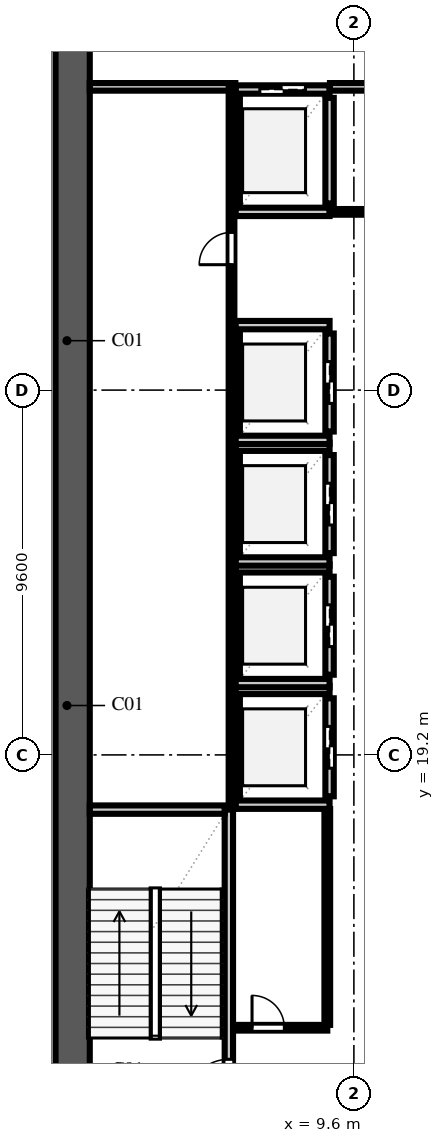
"""IFC4 building model, lengths in metres.
Left out: names, types, materials, properties, quantities, classifications, styles, units other than length and angle.
Written with IfcOpenShell. Run it as: python <this file> out.ifc"""

import sys

from ifc_helpers import new_model, si_unit, direction, frame, frame_2d, origin, place, context, subcontext, project, spatial, rectangle, extrude, element, fill, save


model = new_model("IFC4")
c1 = context("Model", 3, precision=1e-05, world=origin(), true_north=direction((0.0, 1.0)))
c2 = subcontext(c1, "Body", "Model", "MODEL_VIEW")
j1 = project(units=[si_unit("LENGTHUNIT", "METRE"), si_unit("PLANEANGLEUNIT", "RADIAN")], contexts=[c1])
p1 = place(None, origin())
s1 = spatial("IfcSite", under=j1, at=p1, CompositionType="ELEMENT")
p2 = place(p1, origin())
s2 = spatial("IfcBuilding", under=s1, at=p2, CompositionType="ELEMENT")
p3 = place(p2, frame((0.0, 0.0, 5.2)))
s3 = spatial("IfcBuildingStorey", under=s2, at=p3, CompositionType="ELEMENT", Elevation=5.2)
p4 = place(p3, frame((2.2, 9.15, 0.0), z_axis=(0.0, 0.0, 1.0), x_axis=(0.0, 1.0, 0.0)))
e1 = element("IfcWall", 1, at=p4, inside=s3, PredefinedType="SHEAR", context=c2, shape_type="SweptSolid", body=[
    extrude(rectangle(XDim=39.3, YDim=0.9, at=frame_2d((19.65, 0.0))), origin(), (0.0, 0.0, 1.0), 4.86),
])
p5 = place(p3, frame((6.31, 9.95, 0.0), z_axis=(0.0, 0.0, 1.0), x_axis=(0.0, 1.0, 0.0)))
e2 = element("IfcWall", 2, at=p5, inside=s3, PredefinedType="SOLIDWALL", context=c2, shape_type="SweptSolid", body=[
    extrude(rectangle(XDim=7.81, YDim=0.22, at=frame_2d((3.905, 0.0))), origin(), (0.0, 0.0, 1.0), 4.86),
])
p6 = place(p5, frame((0.14, 0.0, 0.0)))
e3 = element("IfcOpeningElement", 3, at=p6, cuts=e2, PredefinedType="OPENING", context=c2, shape_type="SweptSolid", body=[
    extrude(rectangle(XDim=1.1, YDim=2.2, at=frame_2d((0.55, 1.1))), frame((0.0, 0.122, 0.0), z_axis=(0.0, -1.0, 0.0), x_axis=(1.0, 0.0, 0.0)), (0.0, 0.0, 1.0), 0.244),
])
p7 = place(p3, frame((2.65, 17.76, 0.0), z_axis=(0.0, 0.0, 1.0), x_axis=(1.0, 0.0, 0.0)))
e4 = element("IfcWall", 4, at=p7, inside=s3, PredefinedType="SOLIDWALL", context=c2, shape_type="SweptSolid", body=[
    extrude(rectangle(XDim=3.55, YDim=0.22, at=frame_2d((1.775, 0.0))), origin(), (0.0, 0.0, 1.0), 4.86),
])
p8 = place(p3, frame((6.49, 18.11, 0.0), z_axis=(0.0, 0.0, 1.0), x_axis=(0.0, 1.0, 0.0)))
e5 = element("IfcWall", 5, at=p8, inside=s3, PredefinedType="SOLIDWALL", context=c2, shape_type="SweptSolid", body=[
    extrude(rectangle(XDim=2.58, YDim=0.22, at=frame_2d((1.29, 0.0))), origin(), (0.0, 0.0, 1.0), 4.86),
])
p9 = place(p3, frame((8.96, 18.11, 0.0), z_axis=(0.0, 0.0, 1.0), x_axis=(0.0, 1.0, 0.0)))
e6 = element("IfcWall", 6, at=p9, inside=s3, PredefinedType="SOLIDWALL", context=c2, shape_type="SweptSolid", body=[
    extrude(rectangle(XDim=2.58, YDim=0.22, at=frame_2d((1.29, 0.0))), origin(), (0.0, 0.0, 1.0), 4.86),
])
p10 = place(p9, frame((0.74, 0.0, 0.0)))
e7 = element("IfcOpeningElement", 7, at=p10, cuts=e6, PredefinedType="OPENING", context=c2, shape_type="SweptSolid", body=[
    extrude(rectangle(XDim=1.1, YDim=2.2, at=frame_2d((0.55, 1.1))), frame((0.0, 0.122, 0.0), z_axis=(0.0, -1.0, 0.0), x_axis=(1.0, 0.0, 0.0)), (0.0, 0.0, 1.0), 0.244),
])
for number, where, z_axis, x_axis in (
    (8, (6.49, 17.89, 0.0), (0.0, 0.0, 1.0), (1.0, 0.0, 0.0)),
    (9, (6.49, 20.91, 0.0), (0.0, 0.0, 1.0), (1.0, 0.0, 0.0)),
):
    element("IfcWall", number, at=place(p3, frame(where, z_axis=z_axis, x_axis=x_axis)), inside=s3, PredefinedType="SOLIDWALL", context=c2, shape_type="SweptSolid", body=[
        extrude(rectangle(XDim=2.47, YDim=0.22, at=frame_2d((1.235, 0.0))), origin(), (0.0, 0.0, 1.0), 4.86),
    ])
p11 = place(p3, frame((6.49, 21.31, 0.0), z_axis=(0.0, 0.0, 1.0), x_axis=(0.0, 1.0, 0.0)))
e10 = element("IfcWall", 10, at=p11, inside=s3, PredefinedType="SOLIDWALL", context=c2, shape_type="SweptSolid", body=[
    extrude(rectangle(XDim=2.58, YDim=0.22, at=frame_2d((1.29, 0.0))), origin(), (0.0, 0.0, 1.0), 4.86),
])
p12 = place(p3, frame((8.96, 21.31, 0.0), z_axis=(0.0, 0.0, 1.0), x_axis=(0.0, 1.0, 0.0)))
e11 = element("IfcWall", 11, at=p12, inside=s3, PredefinedType="SOLIDWALL", context=c2, shape_type="SweptSolid", body=[
    extrude(rectangle(XDim=2.58, YDim=0.22, at=frame_2d((1.29, 0.0))), origin(), (0.0, 0.0, 1.0), 4.86),
])
p13 = place(p12, frame((0.74, 0.0, 0.0)))
e12 = element("IfcOpeningElement", 12, at=p13, cuts=e11, PredefinedType="OPENING", context=c2, shape_type="SweptSolid", body=[
    extrude(rectangle(XDim=1.1, YDim=2.2, at=frame_2d((0.55, 1.1))), frame((0.0, 0.122, 0.0), z_axis=(0.0, -1.0, 0.0), x_axis=(1.0, 0.0, 0.0)), (0.0, 0.0, 1.0), 0.244),
])
for number, where, z_axis, x_axis in (
    (13, (6.49, 21.09, 0.0), (0.0, 0.0, 1.0), (1.0, 0.0, 0.0)),
    (14, (6.49, 24.11, 0.0), (0.0, 0.0, 1.0), (1.0, 0.0, 0.0)),
):
    element("IfcWall", number, at=place(p3, frame(where, z_axis=z_axis, x_axis=x_axis)), inside=s3, PredefinedType="SOLIDWALL", context=c2, shape_type="SweptSolid", body=[
        extrude(rectangle(XDim=2.47, YDim=0.22, at=frame_2d((1.235, 0.0))), origin(), (0.0, 0.0, 1.0), 4.86),
    ])
p14 = place(p3, frame((6.49, 24.51, 0.0), z_axis=(0.0, 0.0, 1.0), x_axis=(0.0, 1.0, 0.0)))
e15 = element("IfcWall", 15, at=p14, inside=s3, PredefinedType="SOLIDWALL", context=c2, shape_type="SweptSolid", body=[
    extrude(rectangle(XDim=2.58, YDim=0.22, at=frame_2d((1.29, 0.0))), origin(), (0.0, 0.0, 1.0), 4.86),
])
p15 = place(p3, frame((8.96, 24.51, 0.0), z_axis=(0.0, 0.0, 1.0), x_axis=(0.0, 1.0, 0.0)))
e16 = element("IfcWall", 16, at=p15, inside=s3, PredefinedType="SOLIDWALL", context=c2, shape_type="SweptSolid", body=[
    extrude(rectangle(XDim=2.58, YDim=0.22, at=frame_2d((1.29, 0.0))), origin(), (0.0, 0.0, 1.0), 4.86),
])
p16 = place(p15, frame((0.74, 0.0, 0.0)))
e17 = element("IfcOpeningElement", 17, at=p16, cuts=e16, PredefinedType="OPENING", context=c2, shape_type="SweptSolid", body=[
    extrude(rectangle(XDim=1.1, YDim=2.2, at=frame_2d((0.55, 1.1))), frame((0.0, 0.122, 0.0), z_axis=(0.0, -1.0, 0.0), x_axis=(1.0, 0.0, 0.0)), (0.0, 0.0, 1.0), 0.244),
])
for number, where, z_axis, x_axis in (
    (18, (6.49, 24.29, 0.0), (0.0, 0.0, 1.0), (1.0, 0.0, 0.0)),
    (19, (6.49, 27.31, 0.0), (0.0, 0.0, 1.0), (1.0, 0.0, 0.0)),
):
    element("IfcWall", number, at=place(p3, frame(where, z_axis=z_axis, x_axis=x_axis)), inside=s3, PredefinedType="SOLIDWALL", context=c2, shape_type="SweptSolid", body=[
        extrude(rectangle(XDim=2.47, YDim=0.22, at=frame_2d((1.235, 0.0))), origin(), (0.0, 0.0, 1.0), 4.86),
    ])
p17 = place(p3, frame((6.49, 27.71, 0.0), z_axis=(0.0, 0.0, 1.0), x_axis=(0.0, 1.0, 0.0)))
e20 = element("IfcWall", 20, at=p17, inside=s3, PredefinedType="SOLIDWALL", context=c2, shape_type="SweptSolid", body=[
    extrude(rectangle(XDim=2.58, YDim=0.22, at=frame_2d((1.29, 0.0))), origin(), (0.0, 0.0, 1.0), 4.86),
])
p18 = place(p3, frame((8.96, 27.71, 0.0), z_axis=(0.0, 0.0, 1.0), x_axis=(0.0, 1.0, 0.0)))
e21 = element("IfcWall", 21, at=p18, inside=s3, PredefinedType="SOLIDWALL", context=c2, shape_type="SweptSolid", body=[
    extrude(rectangle(XDim=2.58, YDim=0.22, at=frame_2d((1.29, 0.0))), origin(), (0.0, 0.0, 1.0), 4.86),
])
p19 = place(p18, frame((0.74, 0.0, 0.0)))
e22 = element("IfcOpeningElement", 22, at=p19, cuts=e21, PredefinedType="OPENING", context=c2, shape_type="SweptSolid", body=[
    extrude(rectangle(XDim=1.1, YDim=2.2, at=frame_2d((0.55, 1.1))), frame((0.0, 0.122, 0.0), z_axis=(0.0, -1.0, 0.0), x_axis=(1.0, 0.0, 0.0)), (0.0, 0.0, 1.0), 0.244),
])
for number, where, z_axis, x_axis in (
    (23, (6.49, 27.49, 0.0), (0.0, 0.0, 1.0), (1.0, 0.0, 0.0)),
    (24, (6.49, 30.51, 0.0), (0.0, 0.0, 1.0), (1.0, 0.0, 0.0)),
):
    element("IfcWall", number, at=place(p3, frame(where, z_axis=z_axis, x_axis=x_axis)), inside=s3, PredefinedType="SOLIDWALL", context=c2, shape_type="SweptSolid", body=[
        extrude(rectangle(XDim=2.47, YDim=0.22, at=frame_2d((1.235, 0.0))), origin(), (0.0, 0.0, 1.0), 4.86),
    ])
for number, where, z_axis, x_axis in (
    (25, (6.49, 33.71, 0.0), (0.0, 0.0, 1.0), (0.0, 1.0, 0.0)),
    (26, (8.96, 33.71, 0.0), (0.0, 0.0, 1.0), (0.0, 1.0, 0.0)),
):
    element("IfcWall", number, at=place(p3, frame(where, z_axis=z_axis, x_axis=x_axis)), inside=s3, PredefinedType="SOLIDWALL", context=c2, shape_type="SweptSolid", body=[
        extrude(rectangle(XDim=2.78, YDim=0.22, at=frame_2d((1.39, 0.0))), origin(), (0.0, 0.0, 1.0), 4.86),
    ])
p20 = place(p3, frame((6.49, 33.49, 0.0), z_axis=(0.0, 0.0, 1.0), x_axis=(1.0, 0.0, 0.0)))
e27 = element("IfcWall", 27, at=p20, inside=s3, PredefinedType="SOLIDWALL", context=c2, shape_type="SweptSolid", body=[
    extrude(rectangle(XDim=2.47, YDim=0.22, at=frame_2d((1.235, 0.0))), origin(), (0.0, 0.0, 1.0), 4.86),
])
p21 = place(p3, frame((6.49, 36.71, 0.0), z_axis=(0.0, 0.0, 1.0), x_axis=(1.0, 0.0, 0.0)))
e28 = element("IfcWall", 28, at=p21, inside=s3, PredefinedType="SOLIDWALL", context=c2, shape_type="SweptSolid", body=[
    extrude(rectangle(XDim=2.47, YDim=0.22, at=frame_2d((1.235, 0.0))), origin(), (0.0, 0.0, 1.0), 4.86),
])
p22 = place(p21, frame((0.635, 0.0, 0.0)))
e29 = element("IfcOpeningElement", 29, at=p22, cuts=e28, PredefinedType="OPENING", context=c2, shape_type="SweptSolid", body=[
    extrude(rectangle(XDim=1.2, YDim=2.2, at=frame_2d((0.6, 1.1))), frame((0.0, 0.122, 0.0), z_axis=(0.0, -1.0, 0.0), x_axis=(1.0, 0.0, 0.0)), (0.0, 0.0, 1.0), 0.244),
])
p23 = place(p3, frame((2.65, 36.78, 0.0), z_axis=(0.0, 0.0, 1.0), x_axis=(1.0, 0.0, 0.0)))
e30 = element("IfcWall", 30, at=p23, inside=s3, PredefinedType="SOLIDWALL", context=c2, shape_type="SweptSolid", body=[
    extrude(rectangle(XDim=3.83, YDim=0.2, at=frame_2d((1.915, 0.0))), origin(), (0.0, 0.0, 1.0), 4.86),
])
p24 = place(p3, frame((8.97, 36.78, 0.0), z_axis=(0.0, 0.0, 1.0), x_axis=(1.0, 0.0, 0.0)))
e31 = element("IfcWall", 31, at=p24, inside=s3, PredefinedType="SOLIDWALL", context=c2, shape_type="SweptSolid", body=[
    extrude(rectangle(XDim=1.51, YDim=0.2, at=frame_2d((0.755, 0.0))), origin(), (0.0, 0.0, 1.0), 4.86),
])
p25 = place(p3, frame((8.965, 33.49, 0.0), z_axis=(0.0, 0.0, 1.0), x_axis=(1.0, 0.0, 0.0)))
e32 = element("IfcWall", 32, at=p25, inside=s3, PredefinedType="PARTITIONING", context=c2, shape_type="SweptSolid", body=[
    extrude(rectangle(XDim=1.52, YDim=0.15, at=frame_2d((0.76, 0.0))), origin(), (0.0, 0.0, 1.0), 4.86),
])
p26 = place(p3, frame((6.42, 12.02, 0.0), z_axis=(0.0, 0.0, 1.0), x_axis=(1.0, 0.0, 0.0)))
e33 = element("IfcWall", 33, at=p26, inside=s3, PredefinedType="PARTITIONING", context=c2, shape_type="SweptSolid", body=[
    extrude(rectangle(XDim=2.48, YDim=0.15, at=frame_2d((1.24, 0.0))), origin(), (0.0, 0.0, 1.0), 4.86),
])
p27 = place(p26, frame((0.5, 0.0, 0.0)))
e34 = element("IfcOpeningElement", 34, at=p27, cuts=e33, PredefinedType="OPENING", context=c2, shape_type="SweptSolid", body=[
    extrude(rectangle(XDim=0.85, YDim=2.1, at=frame_2d((0.425, 1.05))), frame((0.0, 0.087, 0.0), z_axis=(0.0, -1.0, 0.0), x_axis=(1.0, 0.0, 0.0)), (0.0, 0.0, 1.0), 0.174),
])
p28 = place(p3, frame((8.9, 12.095, 0.0), z_axis=(0.0, 0.0, 1.0), x_axis=(0.0, 1.0, 0.0)))
e35 = element("IfcWall", 35, at=p28, inside=s3, PredefinedType="PARTITIONING", context=c2, shape_type="SweptSolid", body=[
    extrude(rectangle(XDim=5.68, YDim=0.15, at=frame_2d((2.84, 0.0))), origin(), (0.0, 0.0, 1.0), 4.86),
])
p29 = place(p3, frame((6.38, 17.8, 0.0), z_axis=(0.0, 0.0, 1.0), x_axis=(0.0, 1.0, 0.0)))
e36 = element("IfcWall", 36, at=p29, inside=s3, PredefinedType="PARTITIONING", context=c2, shape_type="SweptSolid", body=[
    extrude(rectangle(XDim=18.98, YDim=0.15, at=frame_2d((9.49, 0.0))), origin(), (0.0, 0.0, 1.0), 4.86),
])
p30 = place(p29, frame((14.3, 0.0, 0.0)))
e37 = element("IfcOpeningElement", 37, at=p30, cuts=e36, PredefinedType="OPENING", context=c2, shape_type="SweptSolid", body=[
    extrude(rectangle(XDim=0.85, YDim=2.1, at=frame_2d((0.425, 1.05))), frame((0.0, 0.087, 0.0), z_axis=(0.0, -1.0, 0.0), x_axis=(1.0, 0.0, 0.0)), (0.0, 0.0, 1.0), 0.174),
])
p31 = place(p6, origin())
e38 = element("IfcDoor", 38, at=p31, inside=s3, OperationType="SINGLE_SWING_LEFT", PredefinedType="DOOR", context=c2, shape_type="SweptSolid", body=[
    extrude(rectangle(XDim=1.1, YDim=2.2, at=frame_2d((0.55, 1.1))), frame((0.0, 0.025, 0.0), z_axis=(0.0, -1.0, 0.0), x_axis=(1.0, 0.0, 0.0)), (0.0, 0.0, 1.0), 0.05),
])
fill(e3, e38)
p32 = place(p10, origin())
e39 = element("IfcDoor", 39, at=p32, inside=s3, OperationType="DOUBLE_DOOR_SLIDING", PredefinedType="DOOR", context=c2, shape_type="SweptSolid", body=[
    extrude(rectangle(XDim=1.1, YDim=2.2, at=frame_2d((0.55, 1.1))), frame((0.0, 0.025, 0.0), z_axis=(0.0, -1.0, 0.0), x_axis=(1.0, 0.0, 0.0)), (0.0, 0.0, 1.0), 0.05),
])
fill(e7, e39)
p33 = place(p13, origin())
e40 = element("IfcDoor", 40, at=p33, inside=s3, OperationType="DOUBLE_DOOR_SLIDING", PredefinedType="DOOR", context=c2, shape_type="SweptSolid", body=[
    extrude(rectangle(XDim=1.1, YDim=2.2, at=frame_2d((0.55, 1.1))), frame((0.0, 0.025, 0.0), z_axis=(0.0, -1.0, 0.0), x_axis=(1.0, 0.0, 0.0)), (0.0, 0.0, 1.0), 0.05),
])
fill(e12, e40)
p34 = place(p16, origin())
e41 = element("IfcDoor", 41, at=p34, inside=s3, OperationType="DOUBLE_DOOR_SLIDING", PredefinedType="DOOR", context=c2, shape_type="SweptSolid", body=[
    extrude(rectangle(XDim=1.1, YDim=2.2, at=frame_2d((0.55, 1.1))), frame((0.0, 0.025, 0.0), z_axis=(0.0, -1.0, 0.0), x_axis=(1.0, 0.0, 0.0)), (0.0, 0.0, 1.0), 0.05),
])
fill(e17, e41)
p35 = place(p19, origin())
e42 = element("IfcDoor", 42, at=p35, inside=s3, OperationType="DOUBLE_DOOR_SLIDING", PredefinedType="DOOR", context=c2, shape_type="SweptSolid", body=[
    extrude(rectangle(XDim=1.1, YDim=2.2, at=frame_2d((0.55, 1.1))), frame((0.0, 0.025, 0.0), z_axis=(0.0, -1.0, 0.0), x_axis=(1.0, 0.0, 0.0)), (0.0, 0.0, 1.0), 0.05),
])
fill(e22, e42)
p36 = place(p22, origin())
e43 = element("IfcDoor", 43, at=p36, inside=s3, OperationType="DOUBLE_DOOR_SLIDING", PredefinedType="DOOR", context=c2, shape_type="SweptSolid", body=[
    extrude(rectangle(XDim=1.2, YDim=2.2, at=frame_2d((0.6, 1.1))), frame((0.0, 0.025, 0.0), z_axis=(0.0, -1.0, 0.0), x_axis=(1.0, 0.0, 0.0)), (0.0, 0.0, 1.0), 0.05),
])
fill(e29, e43)
p37 = place(p27, origin())
e44 = element("IfcDoor", 44, at=p37, inside=s3, OperationType="SINGLE_SWING_LEFT", PredefinedType="DOOR", context=c2, shape_type="SweptSolid", body=[
    extrude(rectangle(XDim=0.85, YDim=2.1, at=frame_2d((0.425, 1.05))), frame((0.0, 0.025, 0.0), z_axis=(0.0, -1.0, 0.0), x_axis=(1.0, 0.0, 0.0)), (0.0, 0.0, 1.0), 0.05),
])
fill(e34, e44)
p38 = place(p30, origin())
e45 = element("IfcDoor", 45, at=p38, inside=s3, OperationType="SINGLE_SWING_LEFT", PredefinedType="DOOR", context=c2, shape_type="SweptSolid", body=[
    extrude(rectangle(XDim=0.85, YDim=2.1, at=frame_2d((0.425, 1.05))), frame((0.0, 0.025, 0.0), z_axis=(0.0, -1.0, 0.0), x_axis=(1.0, 0.0, 0.0)), (0.0, 0.0, 1.0), 0.05),
])
fill(e37, e45)
save(model, sys.argv[1])
